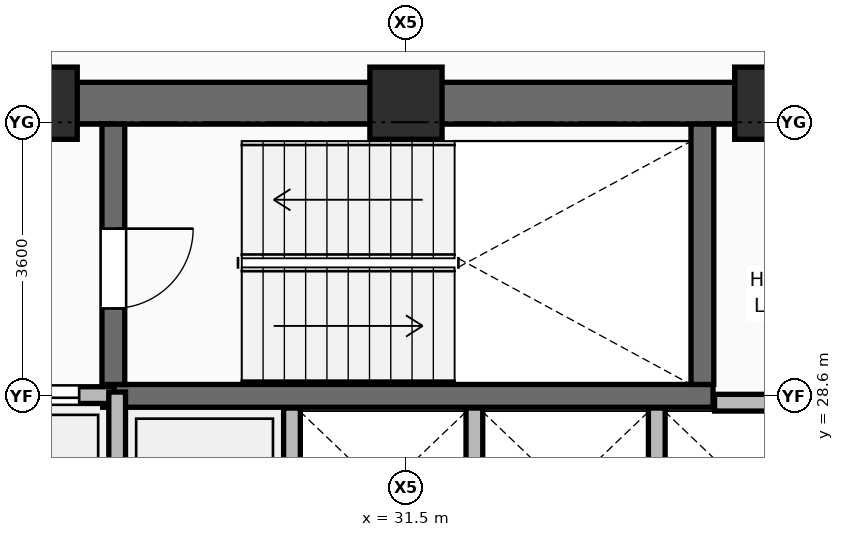
"""IFC4 building model, lengths in metres.
Left out: names, types, materials, properties, quantities, classifications, styles, units other than length and angle.
Written with IfcOpenShell. Run it as: python <this file> out.ifc"""

import sys

from ifc_helpers import new_model, si_unit, direction, frame, frame_2d, origin, origin_2d, place, context, subcontext, project, spatial, rectangle, extrude, element, fill, save


model = new_model("IFC4")
c1 = context("Model", 3, precision=1e-05, world=origin(), true_north=direction((0.0, 1.0)))
c2 = subcontext(c1, "Body", "Model", "MODEL_VIEW")
j1 = project(units=[si_unit("LENGTHUNIT", "METRE"), si_unit("PLANEANGLEUNIT", "RADIAN")], contexts=[c1])
p1 = place(None, origin())
s1 = spatial("IfcSite", under=j1, at=p1, CompositionType="ELEMENT")
p2 = place(p1, origin())
s2 = spatial("IfcBuilding", under=s1, at=p2, CompositionType="ELEMENT")
p3 = place(p2, frame((0.0, 0.0, 145.95)))
s3 = spatial("IfcBuildingStorey", under=s2, at=p3, CompositionType="ELEMENT", Elevation=145.95)
for number, where, z_axis, x_axis in (
    (1, (26.7, 32.45, 0.0), (0.0, 0.0, 1.0), (1.0, 0.0, 0.0)),
    (2, (31.5, 32.45, 0.0), (0.0, 0.0, 1.0), (1.0, 0.0, 0.0)),
    (3, (36.3, 32.45, 0.0), (0.0, 0.0, 1.0), (1.0, 0.0, 0.0)),
):
    element("IfcColumn", number, at=place(p3, frame(where, z_axis=z_axis, x_axis=x_axis)), inside=s3, PredefinedType="COLUMN", context=c2, shape_type="SweptSolid", body=[
        extrude(rectangle(XDim=0.95, YDim=0.95, at=origin_2d()), origin(), (0.0, 0.0, 1.0), 3.75),
    ])
p4 = place(p3, frame((30.0, 25.71, 0.0), z_axis=(0.0, 0.0, 1.0), x_axis=(0.0, 1.0, 0.0)))
e4 = element("IfcWall", 4, at=p4, inside=s3, PredefinedType="PARTITIONING", context=c2, shape_type="SweptSolid", body=[
    extrude(rectangle(XDim=2.73, YDim=0.22, at=frame_2d((1.365, 0.0))), origin(), (0.0, 0.0, 1.0), 3.545),
])
p5 = place(p3, frame((32.4, 26.2, 0.0), z_axis=(0.0, 0.0, 1.0), x_axis=(0.0, 1.0, 0.0)))
e5 = element("IfcWall", 5, at=p5, inside=s3, PredefinedType="PARTITIONING", context=c2, shape_type="SweptSolid", body=[
    extrude(rectangle(XDim=2.24, YDim=0.22, at=frame_2d((1.12, 0.0))), origin(), (0.0, 0.0, 1.0), 3.545),
])
p6 = place(p3, frame((34.8, 26.23, 0.0), z_axis=(0.0, 0.0, 1.0), x_axis=(0.0, 1.0, 0.0)))
e6 = element("IfcWall", 6, at=p6, inside=s3, PredefinedType="PARTITIONING", context=c2, shape_type="SweptSolid", body=[
    extrude(rectangle(XDim=2.21, YDim=0.22, at=frame_2d((1.105, 0.0))), origin(), (0.0, 0.0, 1.0), 3.545),
])
p7 = place(p3, frame((21.625, 32.45, 0.0), z_axis=(0.0, 0.0, 1.0), x_axis=(1.0, 0.0, 0.0)))
e7 = element("IfcWall", 7, at=p7, inside=s3, PredefinedType="SHEAR", context=c2, shape_type="SweptSolid", body=[
    extrude(rectangle(XDim=19.75, YDim=0.55, at=frame_2d((9.875, 0.0))), origin(), (0.0, 0.0, 1.0), 3.57),
])
p8 = place(p7, frame((2.125, 0.0, 0.0)))
e8 = element("IfcOpeningElement", 8, at=p8, cuts=e7, PredefinedType="OPENING", context=c2, shape_type="SweptSolid", body=[
    extrude(rectangle(XDim=1.1, YDim=2.1, at=frame_2d((0.55, 1.05))), frame((0.0, 0.285, 0.0), z_axis=(0.0, -1.0, 0.0), x_axis=(1.0, 0.0, 0.0)), (0.0, 0.0, 1.0), 0.57),
])
p9 = place(p7, frame((15.515, 0.0, 0.0)))
e9 = element("IfcOpeningElement", 9, at=p9, cuts=e7, PredefinedType="OPENING", context=c2, shape_type="SweptSolid", body=[
    extrude(rectangle(XDim=1.0, YDim=2.1, at=frame_2d((0.5, 1.05))), frame((0.0, 0.285, 0.0), z_axis=(0.0, -1.0, 0.0), x_axis=(1.0, 0.0, 0.0)), (0.0, 0.0, 1.0), 0.57),
])
p10 = place(p7, frame((17.525, 0.0, 0.0)))
e10 = element("IfcOpeningElement", 10, at=p10, cuts=e7, PredefinedType="OPENING", context=c2, shape_type="SweptSolid", body=[
    extrude(rectangle(XDim=0.9, YDim=2.1, at=frame_2d((0.45, 1.05))), frame((0.0, 0.285, 0.0), z_axis=(0.0, -1.0, 0.0), x_axis=(1.0, 0.0, 0.0)), (0.0, 0.0, 1.0), 0.57),
])
p11 = place(p3, frame((27.51, 28.6, 0.0), z_axis=(0.0, 0.0, 1.0), x_axis=(1.0, 0.0, 0.0)))
e11 = element("IfcWall", 11, at=p11, inside=s3, PredefinedType="SHEAR", context=c2, shape_type="SweptSolid", body=[
    extrude(rectangle(XDim=8.03, YDim=0.3, at=frame_2d((4.015, 0.0))), origin(), (0.0, 0.0, 1.0), 3.57),
])
p12 = place(p3, frame((27.65, 28.75, 0.0), z_axis=(0.0, 0.0, 1.0), x_axis=(0.0, 1.0, 0.0)))
e12 = element("IfcWall", 12, at=p12, inside=s3, PredefinedType="SHEAR", context=c2, shape_type="SweptSolid", body=[
    extrude(rectangle(XDim=3.425, YDim=0.3, at=frame_2d((1.712, 0.0))), origin(), (0.0, 0.0, 1.0), 3.57),
])
p13 = place(p12, frame((1.0, 0.0, 0.0)))
e13 = element("IfcOpeningElement", 13, at=p13, cuts=e12, PredefinedType="OPENING", context=c2, shape_type="SweptSolid", body=[
    extrude(rectangle(XDim=1.05, YDim=2.1, at=frame_2d((0.525, 1.05))), frame((0.0, 0.16, 0.0), z_axis=(0.0, -1.0, 0.0), x_axis=(1.0, 0.0, 0.0)), (0.0, 0.0, 1.0), 0.32),
])
p14 = place(p3, frame((35.4, 28.75, 0.0), z_axis=(0.0, 0.0, 1.0), x_axis=(0.0, 1.0, 0.0)))
e14 = element("IfcWall", 14, at=p14, inside=s3, PredefinedType="SHEAR", context=c2, shape_type="SweptSolid", body=[
    extrude(rectangle(XDim=3.425, YDim=0.3, at=frame_2d((1.712, 0.0))), origin(), (0.0, 0.0, 1.0), 3.57),
])
p15 = place(p3, frame((25.64, 28.61, 0.0), z_axis=(0.0, 0.0, 1.0), x_axis=(1.0, 0.0, 0.0)))
e15 = element("IfcWall", 15, at=p15, inside=s3, PredefinedType="PARTITIONING", context=c2, shape_type="SweptSolid", body=[
    extrude(rectangle(XDim=2.02, YDim=0.22, at=frame_2d((1.01, 0.0))), origin(), (0.0, 0.0, 1.0), 3.55),
])
p16 = place(p15, frame((0.46, 0.0, 0.0)))
e16 = element("IfcOpeningElement", 16, at=p16, cuts=e15, PredefinedType="OPENING", context=c2, shape_type="SweptSolid", body=[
    extrude(rectangle(XDim=1.1, YDim=2.2, at=frame_2d((0.55, 1.1))), frame((0.0, 0.12, 0.0), z_axis=(0.0, -1.0, 0.0), x_axis=(1.0, 0.0, 0.0)), (0.0, 0.0, 1.0), 0.24),
])
p17 = place(p3, frame((35.56, 28.51, 0.0), z_axis=(0.0, 0.0, 1.0), x_axis=(1.0, 0.0, 0.0)))
e17 = element("IfcWall", 17, at=p17, inside=s3, PredefinedType="PARTITIONING", context=c2, shape_type="SweptSolid", body=[
    extrude(rectangle(XDim=1.6, YDim=0.22, at=frame_2d((0.8, 0.0))), origin(), (0.0, 0.0, 1.0), 3.55),
])
p18 = place(p3, frame((27.7, 25.65, 0.0), z_axis=(0.0, 0.0, 1.0), x_axis=(0.0, 1.0, 0.0)))
e18 = element("IfcWall", 18, at=p18, inside=s3, PredefinedType="PARTITIONING", context=c2, shape_type="SweptSolid", body=[
    extrude(rectangle(XDim=3.0, YDim=0.22, at=frame_2d((1.5, 0.0))), origin(), (0.0, 0.0, 1.0), 3.55),
])
p19 = place(p13, frame((1.05, 0.0, 0.0), z_axis=(0.0, 0.0, 1.0), x_axis=(-1.0, 0.0, 0.0)))
e19 = element("IfcDoor", 19, at=p19, inside=s3, OperationType="SINGLE_SWING_LEFT", PredefinedType="DOOR", context=c2, shape_type="SweptSolid", body=[
    extrude(rectangle(XDim=1.05, YDim=2.1, at=frame_2d((0.525, 1.05))), frame((0.0, 0.025, 0.0), z_axis=(0.0, -1.0, 0.0), x_axis=(1.0, 0.0, 0.0)), (0.0, 0.0, 1.0), 0.05),
])
fill(e13, e19)
p20 = place(p16, origin())
e20 = element("IfcDoor", 20, at=p20, inside=s3, OperationType="DOUBLE_DOOR_SLIDING", PredefinedType="DOOR", context=c2, shape_type="SweptSolid", body=[
    extrude(rectangle(XDim=1.1, YDim=2.2, at=frame_2d((0.55, 1.1))), frame((0.0, 0.025, 0.0), z_axis=(0.0, -1.0, 0.0), x_axis=(1.0, 0.0, 0.0)), (0.0, 0.0, 1.0), 0.05),
])
fill(e16, e20)
save(model, sys.argv[1])
